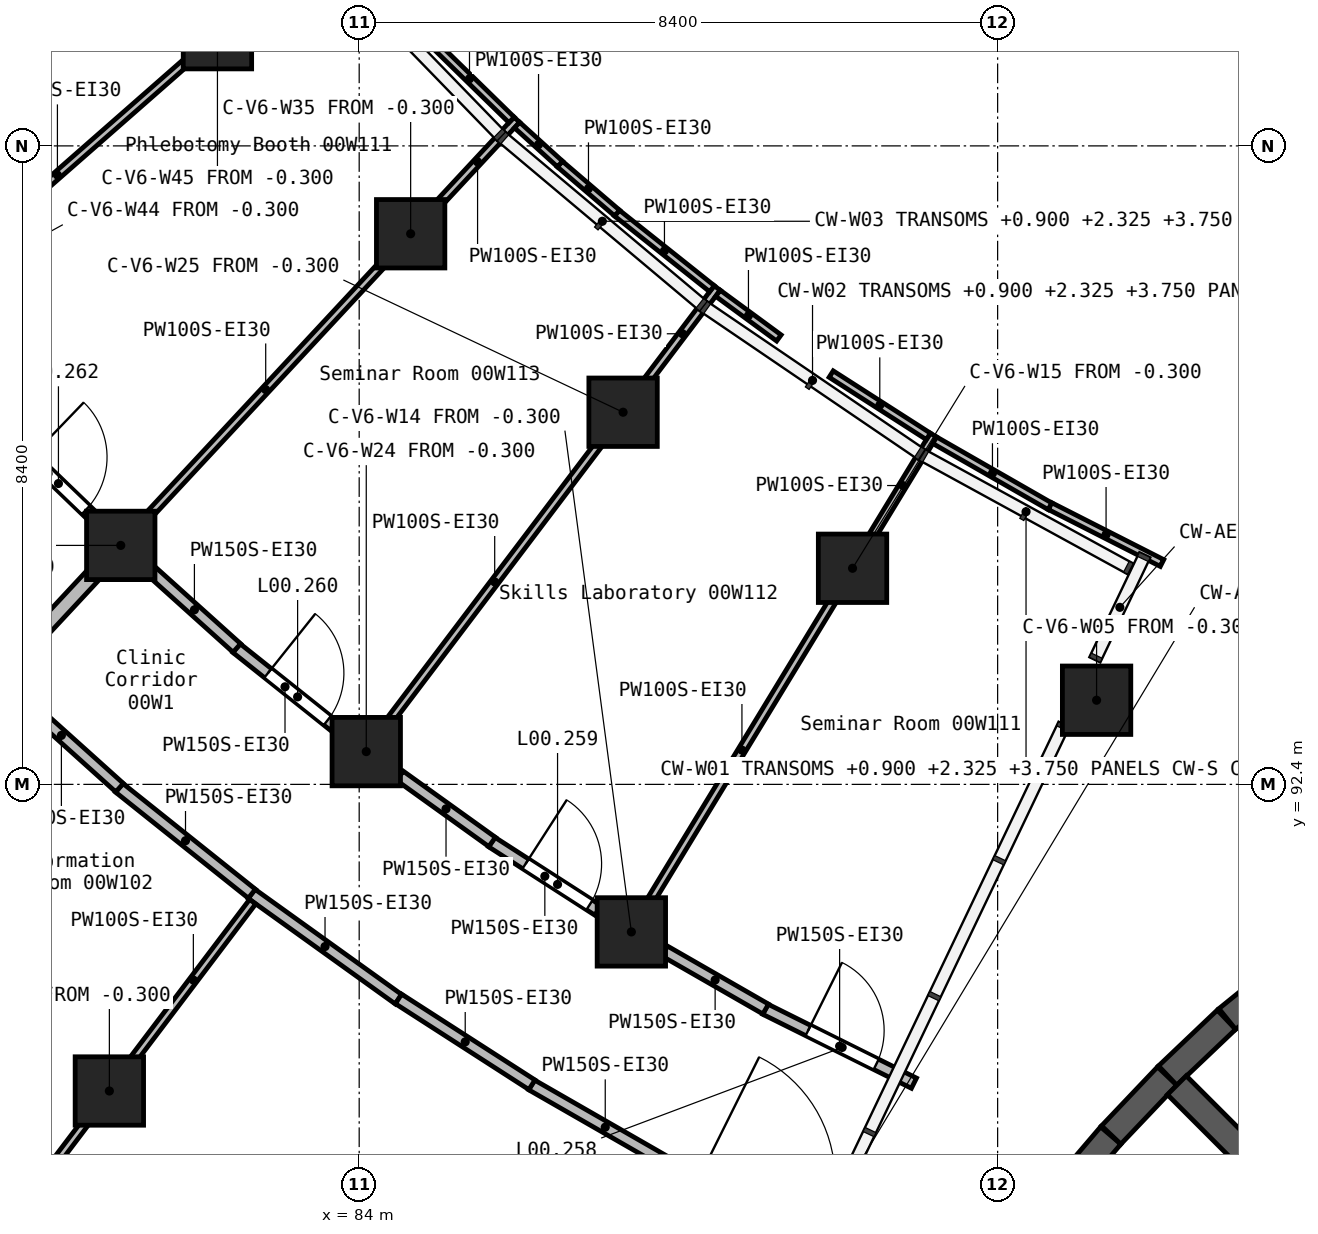
"""IFC4 building model, lengths in metres.
Left out: names, types, materials, properties, quantities, classifications, styles, units other than length and angle.
Written with IfcOpenShell. Run it as: python <this file> out.ifc"""

import sys

from ifc_helpers import new_model, si_unit, direction, frame, frame_2d, origin, origin_2d, place, context, subcontext, project, spatial, rectangle, extrude, element, fill, save


model = new_model("IFC4")
c1 = context("Model", 3, precision=1e-05, world=origin(), true_north=direction((0.0, 1.0)))
c2 = subcontext(c1, "Body", "Model", "MODEL_VIEW")
j1 = project(units=[si_unit("LENGTHUNIT", "METRE"), si_unit("PLANEANGLEUNIT", "RADIAN")], contexts=[c1])
p1 = place(None, origin())
s1 = spatial("IfcSite", under=j1, at=p1, CompositionType="ELEMENT")
p2 = place(p1, origin())
s2 = spatial("IfcBuilding", under=s1, at=p2, CompositionType="ELEMENT")
p3 = place(p2, origin())
s3 = spatial("IfcBuildingStorey", under=s2, at=p3, CompositionType="ELEMENT", Elevation=0.0)
for number, where, z_axis, x_axis in (
    (1, (80.713, 88.366, -0.3), (0.0, 0.0, 1.0), (1.0, 0.0, 0.0)),
    (2, (80.863, 95.544, -0.3), (0.0, 0.0, 1.0), (1.0, 0.0, 0.0)),
    (3, (82.135, 102.263, -0.3), (0.0, 0.0, 1.0), (1.0, 0.0, 0.0)),
    (4, (84.093, 92.831, -0.3), (0.0, 0.0, 1.0), (1.0, 0.0, 0.0)),
    (5, (84.677, 99.644, -0.3), (0.0, 0.0, 1.0), (1.0, 0.0, 0.0)),
    (6, (87.472, 97.296, -0.3), (0.0, 0.0, 1.0), (1.0, 0.0, 0.0)),
    (7, (87.581, 90.459, -0.3), (0.0, 0.0, 1.0), (1.0, 0.0, 0.0)),
    (8, (90.491, 95.243, -0.3), (0.0, 0.0, 1.0), (1.0, 0.0, 0.0)),
    (9, (93.702, 93.507, -0.3), (0.0, 0.0, 1.0), (1.0, 0.0, 0.0)),
):
    element("IfcColumn", number, at=place(p3, frame(where, z_axis=z_axis, x_axis=x_axis)), inside=s3, PredefinedType="COLUMN", context=c2, shape_type="SweptSolid", body=[
        extrude(rectangle(XDim=0.9, YDim=0.9, at=origin_2d()), origin(), (0.0, 0.0, 1.0), 5.7),
    ])
p4 = place(p3, frame((93.195, 86.969, -0.3), z_axis=(0.0, 0.0, 1.0), x_axis=(0.649301127712, 0.760531423119, 0.0)))
e10 = element("IfcWall", 10, at=p4, inside=s3, PredefinedType="SHEAR", context=c2, shape_type="SweptSolid", body=[
    extrude(rectangle(XDim=1.067, YDim=0.35, at=frame_2d((0.533, 0.0))), origin(), (0.0, 0.0, 1.0), 5.7),
])
p5 = place(p3, frame((93.894, 87.787, -0.3), z_axis=(0.0, 0.0, 1.0), x_axis=(0.688725463476, 0.725022231356, 0.0)))
e11 = element("IfcWall", 11, at=p5, inside=s3, PredefinedType="SHEAR", context=c2, shape_type="SweptSolid", body=[
    extrude(rectangle(XDim=1.07, YDim=0.35, at=frame_2d((0.535, 0.0))), origin(), (0.0, 0.0, 1.0), 5.7),
])
p6 = place(p3, frame((94.637, 88.569, -0.3), z_axis=(0.0, 0.0, 1.0), x_axis=(0.724948027673, 0.688803569367, 0.0)))
e12 = element("IfcWall", 12, at=p6, inside=s3, PredefinedType="SHEAR", context=c2, shape_type="SweptSolid", body=[
    extrude(rectangle(XDim=1.067, YDim=0.35, at=frame_2d((0.534, 0.0))), origin(), (0.0, 0.0, 1.0), 5.7),
])
p7 = place(p3, frame((94.758, 88.442, -0.3), z_axis=(0.0, 0.0, 1.0), x_axis=(0.707106781187, -0.707106781187, 0.0)))
e13 = element("IfcWall", 13, at=p7, inside=s3, PredefinedType="SHEAR", context=c2, shape_type="SweptSolid", body=[
    extrude(rectangle(XDim=3.249, YDim=0.35, at=frame_2d((1.625, 0.0))), origin(), (0.0, 0.0, 1.0), 5.7),
])
p8 = place(p3, frame((97.087, 90.662, -0.3), z_axis=(0.0, 0.0, 1.0), x_axis=(-0.777231602748, -0.629214618146, 0.0)))
e14 = element("IfcWall", 14, at=p8, inside=s3, PredefinedType="SHEAR", context=c2, shape_type="SweptSolid", body=[
    extrude(rectangle(XDim=2.143, YDim=0.35, at=frame_2d((1.071, 0.0))), origin(), (0.0, 0.0, 1.0), 5.7),
])
p9 = place(p3, frame((79.19, 93.746, 0.0), z_axis=(0.0, 0.0, 1.0), x_axis=(0.681171780306, 0.732123627344, 0.0)))
e15 = element("IfcWall", 15, at=p9, inside=s3, PredefinedType="SOLIDWALL", context=c2, shape_type="SweptSolid", body=[
    extrude(rectangle(XDim=1.974, YDim=0.2, at=frame_2d((0.987, 0.0))), origin(), (0.0, 0.0, 1.0), 5.05),
])
p10 = place(p3, frame((82.583, 90.961, 0.0), z_axis=(0.0, 0.0, 1.0), x_axis=(0.812456963848, -0.583021167622, 0.0)))
e16 = element("IfcWall", 16, at=p10, inside=s3, PredefinedType="PARTITIONING", context=c2, shape_type="SweptSolid", body=[
    extrude(rectangle(XDim=2.381, YDim=0.15, at=frame_2d((1.191, 0.0))), origin(), (0.0, 0.0, 1.0), 5.05),
])
p11 = place(p3, frame((80.841, 92.356, 0.0), z_axis=(0.0, 0.0, 1.0), x_axis=(0.781561025488, -0.62382879337, 0.0)))
e17 = element("IfcWall", 17, at=p11, inside=s3, PredefinedType="PARTITIONING", context=c2, shape_type="SweptSolid", body=[
    extrude(rectangle(XDim=2.235, YDim=0.15, at=frame_2d((1.118, 0.0))), origin(), (0.0, 0.0, 1.0), 5.05),
])
p12 = place(p3, frame((86.268, 88.446, 0.0), z_axis=(0.0, 0.0, 1.0), x_axis=(0.867212921502, -0.497937494852, 0.0)))
e18 = element("IfcWall", 18, at=p12, inside=s3, PredefinedType="PARTITIONING", context=c2, shape_type="SweptSolid", body=[
    extrude(rectangle(XDim=2.235, YDim=0.15, at=frame_2d((1.118, 0.0))), origin(), (0.0, 0.0, 1.0), 5.05),
])
p13 = place(p3, frame((79.316, 93.733, 0.0), z_axis=(0.0, 0.0, 1.0), x_axis=(0.74346507851, -0.668774758073, 0.0)))
e19 = element("IfcWall", 19, at=p13, inside=s3, PredefinedType="PARTITIONING", context=c2, shape_type="SweptSolid", body=[
    extrude(rectangle(XDim=2.059, YDim=0.15, at=frame_2d((1.03, 0.0))), origin(), (0.0, 0.0, 1.0), 5.05),
])
p14 = place(p3, frame((84.517, 89.577, 0.0), z_axis=(0.0, 0.0, 1.0), x_axis=(0.840935250807, -0.541135753717, 0.0)))
e20 = element("IfcWall", 20, at=p14, inside=s3, PredefinedType="PARTITIONING", context=c2, shape_type="SweptSolid", body=[
    extrude(rectangle(XDim=2.088, YDim=0.15, at=frame_2d((1.044, 0.0))), origin(), (0.0, 0.0, 1.0), 5.05),
])
p15 = place(p3, frame((82.385, 94.194, 0.0), z_axis=(0.0, 0.0, 1.0), x_axis=(0.781756052881, -0.623584375833, 0.0)))
e21 = element("IfcWall", 21, at=p15, inside=s3, PredefinedType="PARTITIONING", context=c2, shape_type="SweptSolid", body=[
    extrude(rectangle(XDim=1.636, YDim=0.15, at=frame_2d((0.818, 0.0))), origin(), (0.0, 0.0, 1.0), 5.05),
])
p16 = place(p15, frame((0.53, 0.0, 0.0)))
e22 = element("IfcOpeningElement", 22, at=p16, cuts=e21, PredefinedType="OPENING", context=c2, shape_type="SweptSolid", body=[
    extrude(rectangle(XDim=1.0, YDim=2.1, at=frame_2d((0.5, 1.05))), frame((0.0, 0.085, 0.0), z_axis=(0.0, -1.0, 0.0), x_axis=(1.0, 0.0, 0.0)), (0.0, 0.0, 1.0), 0.17),
])
p17 = place(p3, frame((89.343, 89.442, 0.0), z_axis=(0.0, 0.0, 1.0), x_axis=(0.895274815557, -0.445514314731, 0.0)))
e23 = element("IfcWall", 23, at=p17, inside=s3, PredefinedType="PARTITIONING", context=c2, shape_type="SweptSolid", body=[
    extrude(rectangle(XDim=2.185, YDim=0.15, at=frame_2d((1.092, 0.0))), origin(), (0.0, 0.0, 1.0), 5.05),
])
p18 = place(p17, frame((0.63, 0.0, 0.0)))
e24 = element("IfcOpeningElement", 24, at=p18, cuts=e23, PredefinedType="OPENING", context=c2, shape_type="SweptSolid", body=[
    extrude(rectangle(XDim=1.0, YDim=2.1, at=frame_2d((0.5, 1.05))), frame((0.0, 0.085, 0.0), z_axis=(0.0, -1.0, 0.0), x_axis=(1.0, 0.0, 0.0)), (0.0, 0.0, 1.0), 0.17),
])
p19 = place(p3, frame((85.744, 91.642, 0.0), z_axis=(0.0, 0.0, 1.0), x_axis=(0.840848932624, -0.54126987031, 0.0)))
e25 = element("IfcWall", 25, at=p19, inside=s3, PredefinedType="PARTITIONING", context=c2, shape_type="SweptSolid", body=[
    extrude(rectangle(XDim=1.662, YDim=0.15, at=frame_2d((0.831, 0.0))), origin(), (0.0, 0.0, 1.0), 5.05),
])
p20 = place(p19, frame((0.53, 0.0, 0.0)))
e26 = element("IfcOpeningElement", 26, at=p20, cuts=e25, PredefinedType="OPENING", context=c2, shape_type="SweptSolid", body=[
    extrude(rectangle(XDim=1.0, YDim=2.1, at=frame_2d((0.5, 1.05))), frame((0.0, 0.085, 0.0), z_axis=(0.0, -1.0, 0.0), x_axis=(1.0, 0.0, 0.0)), (0.0, 0.0, 1.0), 0.17),
])
p21 = place(p3, frame((79.301, 97.072, 0.0), z_axis=(0.0, 0.0, 1.0), x_axis=(0.720465115712, -0.69349118022, 0.0)))
e27 = element("IfcWall", 27, at=p21, inside=s3, PredefinedType="PARTITIONING", context=c2, shape_type="SweptSolid", body=[
    extrude(rectangle(XDim=1.684, YDim=0.15, at=frame_2d((0.842, 0.0))), origin(), (0.0, 0.0, 1.0), 5.05),
])
p22 = place(p21, frame((0.53, 0.0, 0.0)))
e28 = element("IfcOpeningElement", 28, at=p22, cuts=e27, PredefinedType="OPENING", context=c2, shape_type="SweptSolid", body=[
    extrude(rectangle(XDim=1.0, YDim=2.1, at=frame_2d((0.5, 1.05))), frame((0.0, 0.085, 0.0), z_axis=(0.0, -1.0, 0.0), x_axis=(1.0, 0.0, 0.0)), (0.0, 0.0, 1.0), 0.17),
])
p23 = place(p3, frame((84.536, 92.513, 0.0), z_axis=(0.0, 0.0, 1.0), x_axis=(0.81243891359, -0.583046320359, 0.0)))
e29 = element("IfcWall", 29, at=p23, inside=s3, PredefinedType="PARTITIONING", context=c2, shape_type="SweptSolid", body=[
    extrude(rectangle(XDim=1.493, YDim=0.15, at=frame_2d((0.747, 0.0))), origin(), (0.0, 0.0, 1.0), 5.05),
])
p24 = place(p3, frame((88.018, 90.208, 0.0), z_axis=(0.0, 0.0, 1.0), x_axis=(0.867174234795, -0.498004865947, 0.0)))
e30 = element("IfcWall", 30, at=p24, inside=s3, PredefinedType="PARTITIONING", context=c2, shape_type="SweptSolid", body=[
    extrude(rectangle(XDim=1.535, YDim=0.15, at=frame_2d((0.768, 0.0))), origin(), (0.0, 0.0, 1.0), 5.05),
])
p25 = place(p3, frame((81.273, 95.199, 0.0), z_axis=(0.0, 0.0, 1.0), x_axis=(0.743576936712, -0.668650386368, 0.0)))
e31 = element("IfcWall", 31, at=p25, inside=s3, PredefinedType="PARTITIONING", context=c2, shape_type="SweptSolid", body=[
    extrude(rectangle(XDim=1.502, YDim=0.15, at=frame_2d((0.751, 0.0))), origin(), (0.0, 0.0, 1.0), 5.05),
])
p26 = place(p3, frame((84.418, 93.26, 0.0), z_axis=(0.0, 0.0, 1.0), x_axis=(0.603501117064, 0.797362152163, 0.0)))
e32 = element("IfcWall", 32, at=p26, inside=s3, PredefinedType="PARTITIONING", context=c2, shape_type="SweptSolid", body=[
    extrude(rectangle(XDim=4.522, YDim=0.1, at=frame_2d((2.261, 0.0))), origin(), (0.0, 0.0, 1.0), 5.05),
])
p27 = place(p3, frame((87.798, 97.726, 0.0), z_axis=(0.0, 0.0, 1.0), x_axis=(0.603534256712, 0.797337068607, 0.0)))
e33 = element("IfcWall", 33, at=p27, inside=s3, PredefinedType="PARTITIONING", context=c2, shape_type="SweptSolid", body=[
    extrude(rectangle(XDim=1.512, YDim=0.1, at=frame_2d((0.756, 0.0))), origin(), (0.0, 0.0, 1.0), 5.05),
])
p28 = place(p3, frame((78.338, 98.933, 0.0), z_axis=(0.0, 0.0, 1.0), x_axis=(0.751823288541, 0.659364650863, 0.0)))
e34 = element("IfcWall", 34, at=p28, inside=s3, PredefinedType="PARTITIONING", context=c2, shape_type="SweptSolid", body=[
    extrude(rectangle(XDim=4.5, YDim=0.1, at=frame_2d((2.25, 0.0))), origin(), (0.0, 0.0, 1.0), 5.05),
])
p29 = place(p3, frame((87.84, 90.885, 0.0), z_axis=(0.0, 0.0, 1.0), x_axis=(0.519618801015, 0.854398210223, 0.0)))
e35 = element("IfcWall", 35, at=p29, inside=s3, PredefinedType="PARTITIONING", context=c2, shape_type="SweptSolid", body=[
    extrude(rectangle(XDim=4.603, YDim=0.1, at=frame_2d((2.302, 0.0))), origin(), (0.0, 0.0, 1.0), 5.05),
])
p30 = place(p3, frame((90.75, 95.668, 0.0), z_axis=(0.0, 0.0, 1.0), x_axis=(0.519552672181, 0.854438424247, 0.0)))
e36 = element("IfcWall", 36, at=p30, inside=s3, PredefinedType="PARTITIONING", context=c2, shape_type="SweptSolid", body=[
    extrude(rectangle(XDim=1.552, YDim=0.1, at=frame_2d((0.776, 0.0))), origin(), (0.0, 0.0, 1.0), 5.05),
])
p31 = place(p3, frame((81.227, 95.935, 0.0), z_axis=(0.0, 0.0, 1.0), x_axis=(0.681211440492, 0.732086725288, 0.0)))
e37 = element("IfcWall", 37, at=p31, inside=s3, PredefinedType="PARTITIONING", context=c2, shape_type="SweptSolid", body=[
    extrude(rectangle(XDim=4.53, YDim=0.1, at=frame_2d((2.265, 0.0))), origin(), (0.0, 0.0, 1.0), 5.05),
])
p32 = place(p3, frame((85.041, 100.034, 0.0), z_axis=(0.0, 0.0, 1.0), x_axis=(0.681296599079, 0.732007475428, 0.0)))
e38 = element("IfcWall", 38, at=p32, inside=s3, PredefinedType="PARTITIONING", context=c2, shape_type="SweptSolid", body=[
    extrude(rectangle(XDim=1.517, YDim=0.1, at=frame_2d((0.758, 0.0))), origin(), (0.0, 0.0, 1.0), 5.05),
])
p33 = place(p3, frame((79.312, 86.515, 0.0), z_axis=(0.0, 0.0, 1.0), x_axis=(0.603588624137, 0.797295912954, 0.0)))
e39 = element("IfcWall", 39, at=p33, inside=s3, PredefinedType="PARTITIONING", context=c2, shape_type="SweptSolid", body=[
    extrude(rectangle(XDim=1.782, YDim=0.1, at=frame_2d((0.891, 0.0))), origin(), (0.0, 0.0, 1.0), 5.05),
])
p34 = place(p3, frame((81.038, 88.796, 0.0), z_axis=(0.0, 0.0, 1.0), x_axis=(0.603561177332, 0.797316690668, 0.0)))
e40 = element("IfcWall", 40, at=p34, inside=s3, PredefinedType="PARTITIONING", context=c2, shape_type="SweptSolid", body=[
    extrude(rectangle(XDim=2.584, YDim=0.1, at=frame_2d((1.292, 0.0))), origin(), (0.0, 0.0, 1.0), 5.05),
])
p35 = place(p3, frame((91.572, 96.928, 0.0), z_axis=(0.0, 0.0, 1.0), x_axis=(0.867607434085, -0.497249776591, 0.0)))
e41 = element("IfcWall", 41, at=p35, inside=s3, PredefinedType="PARTITIONING", context=c2, shape_type="SweptSolid", body=[
    extrude(rectangle(XDim=1.751, YDim=0.1, at=frame_2d((0.875, 0.0))), origin(), (0.0, 0.0, 1.0), 5.05),
])
p36 = place(p3, frame((93.09, 96.06, 0.0), z_axis=(0.0, 0.0, 1.0), x_axis=(0.891511605142, -0.452997856393, 0.0)))
e42 = element("IfcWall", 42, at=p36, inside=s3, PredefinedType="PARTITIONING", context=c2, shape_type="SweptSolid", body=[
    extrude(rectangle(XDim=1.652, YDim=0.1, at=frame_2d((0.826, 0.0))), origin(), (0.0, 0.0, 1.0), 5.05),
])
p37 = place(p3, frame((87.391, 99.916, 0.0), z_axis=(0.0, 0.0, 1.0), x_axis=(0.7827431138, -0.622344934742, 0.0)))
e43 = element("IfcWall", 43, at=p37, inside=s3, PredefinedType="PARTITIONING", context=c2, shape_type="SweptSolid", body=[
    extrude(rectangle(XDim=1.598, YDim=0.1, at=frame_2d((0.799, 0.0))), origin(), (0.0, 0.0, 1.0), 5.05),
])
p38 = place(p3, frame((90.21, 97.798, 0.0), z_axis=(0.0, 0.0, 1.0), x_axis=(0.841976481819, -0.539514229713, 0.0)))
e44 = element("IfcWall", 44, at=p38, inside=s3, PredefinedType="PARTITIONING", context=c2, shape_type="SweptSolid", body=[
    extrude(rectangle(XDim=1.519, YDim=0.1, at=frame_2d((0.76, 0.0))), origin(), (0.0, 0.0, 1.0), 5.05),
])
p39 = place(p3, frame((84.897, 102.224, 0.0), z_axis=(0.0, 0.0, 1.0), x_axis=(0.715491637519, -0.698621297013, 0.0)))
e45 = element("IfcWall", 45, at=p39, inside=s3, PredefinedType="PARTITIONING", context=c2, shape_type="SweptSolid", body=[
    extrude(rectangle(XDim=1.548, YDim=0.1, at=frame_2d((0.774, 0.0))), origin(), (0.0, 0.0, 1.0), 5.05),
])
p40 = place(p3, frame((88.721, 98.861, 0.0), z_axis=(0.0, 0.0, 1.0), x_axis=(0.806061198055, -0.591832193269, 0.0)))
e46 = element("IfcWall", 46, at=p40, inside=s3, PredefinedType="PARTITIONING", context=c2, shape_type="SweptSolid", body=[
    extrude(rectangle(XDim=0.994, YDim=0.1, at=frame_2d((0.497, 0.0))), origin(), (0.0, 0.0, 1.0), 5.05),
])
p41 = place(p3, frame((86.64, 100.562, 0.0), z_axis=(0.0, 0.0, 1.0), x_axis=(0.759638737838, -0.650345283658, 0.0)))
e47 = element("IfcWall", 47, at=p41, inside=s3, PredefinedType="PARTITIONING", context=c2, shape_type="SweptSolid", body=[
    extrude(rectangle(XDim=0.992, YDim=0.1, at=frame_2d((0.496, 0.0))), origin(), (0.0, 0.0, 1.0), 5.05),
])
p42 = place(p3, frame((86.077, 101.074, 0.0), z_axis=(0.0, 0.0, 1.0), x_axis=(0.740693092669, -0.671843540173, 0.0)))
e48 = element("IfcWall", 48, at=p42, inside=s3, PredefinedType="PARTITIONING", context=c2, shape_type="SweptSolid", body=[
    extrude(rectangle(XDim=0.762, YDim=0.1, at=frame_2d((0.381, 0.0))), origin(), (0.0, 0.0, 1.0), 5.05),
])
p43 = place(p18, origin())
e49 = element("IfcDoor", 49, at=p43, inside=s3, OperationType="SINGLE_SWING_RIGHT", PredefinedType="DOOR", context=c2, shape_type="SweptSolid", body=[
    extrude(rectangle(XDim=1.0, YDim=2.1, at=frame_2d((0.5, 1.05))), frame((0.0, 0.025, 0.0), z_axis=(0.0, -1.0, 0.0), x_axis=(1.0, 0.0, 0.0)), (0.0, 0.0, 1.0), 0.05),
])
fill(e24, e49)
p44 = place(p20, origin())
e50 = element("IfcDoor", 50, at=p44, inside=s3, OperationType="SINGLE_SWING_RIGHT", PredefinedType="DOOR", context=c2, shape_type="SweptSolid", body=[
    extrude(rectangle(XDim=1.0, YDim=2.1, at=frame_2d((0.5, 1.05))), frame((0.0, 0.025, 0.0), z_axis=(0.0, -1.0, 0.0), x_axis=(1.0, 0.0, 0.0)), (0.0, 0.0, 1.0), 0.05),
])
fill(e26, e50)
p45 = place(p16, origin())
e51 = element("IfcDoor", 51, at=p45, inside=s3, OperationType="SINGLE_SWING_RIGHT", PredefinedType="DOOR", context=c2, shape_type="SweptSolid", body=[
    extrude(rectangle(XDim=1.0, YDim=2.1, at=frame_2d((0.5, 1.05))), frame((0.0, 0.025, 0.0), z_axis=(0.0, -1.0, 0.0), x_axis=(1.0, 0.0, 0.0)), (0.0, 0.0, 1.0), 0.05),
])
fill(e22, e51)
p46 = place(p22, origin())
e52 = element("IfcDoor", 52, at=p46, inside=s3, OperationType="SINGLE_SWING_RIGHT", PredefinedType="DOOR", context=c2, shape_type="SweptSolid", body=[
    extrude(rectangle(XDim=1.0, YDim=2.1, at=frame_2d((0.5, 1.05))), frame((0.0, 0.025, 0.0), z_axis=(0.0, -1.0, 0.0), x_axis=(1.0, 0.0, 0.0)), (0.0, 0.0, 1.0), 0.05),
])
fill(e28, e52)
save(model, sys.argv[1])
